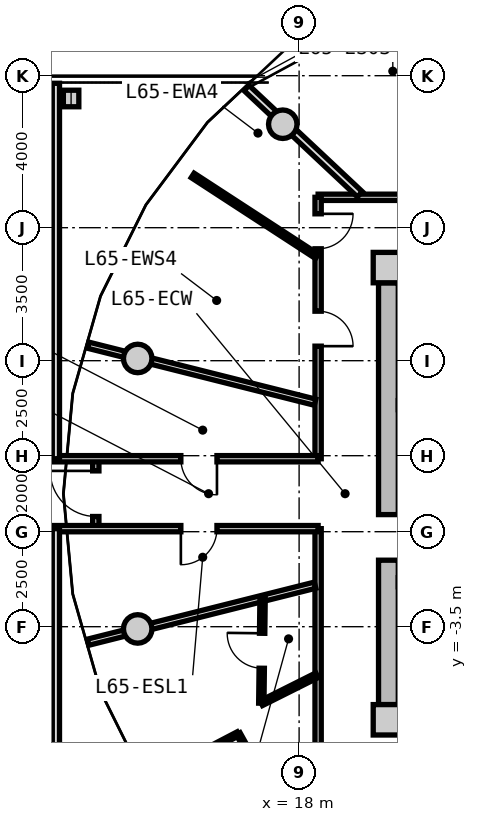
"""IFC4 building model, lengths in metres.
Left out: names, types, materials, properties, quantities, classifications, styles, units other than length and angle.
Written with IfcOpenShell. Run it as: python <this file> out.ifc"""

import sys

from ifc_helpers import new_model, si_unit, direction, frame, frame_2d, origin, origin_2d, place, context, subcontext, project, spatial, rectangle, circle, i_section, extrude, source, transform, mapped, element, fill, save


model = new_model("IFC4")
c1 = context("Model", 3, precision=1e-05, world=origin(), true_north=direction((0.0, 1.0)))
c2 = subcontext(c1, "Body", "Model", "MODEL_VIEW")
j1 = project(units=[si_unit("LENGTHUNIT", "METRE"), si_unit("PLANEANGLEUNIT", "RADIAN")], contexts=[c1])
p1 = place(None, origin())
s1 = spatial("IfcSite", under=j1, at=p1, CompositionType="ELEMENT")
p2 = place(p1, origin())
s2 = spatial("IfcBuilding", under=s1, at=p2, CompositionType="ELEMENT")
p3 = place(p2, frame((0.0, 0.0, 210.85)))
s3 = spatial("IfcBuildingStorey", under=s2, at=p3, CompositionType="ELEMENT", Elevation=210.85)
m1 = source(origin(), c2, "Body", "SweptSolid", [
    extrude(rectangle(XDim=0.8, YDim=0.8, at=origin_2d()), origin(), (0.0, 0.0, 1.0), 3.05),
])
for number, where, z_axis, x_axis in (
    (1, (20.35, -5.95, 0.0), (0.0, 0.0, 1.0), (1.0, 0.0, 0.0)),
    (2, (20.35, 5.95, 0.0), (0.0, 0.0, 1.0), (1.0, 0.0, 0.0)),
):
    element("IfcColumn", number, at=place(p3, frame(where, z_axis=z_axis, x_axis=x_axis)), inside=s3, PredefinedType="COLUMN", context=c2, shape_type="MappedRepresentation", body=[
        mapped(m1, transform((0.0, 0.0, 0.0), x_axis=(1.0, 0.0, 0.0), y_axis=(0.0, 1.0, 0.0), z_axis=(0.0, 0.0, 1.0), scale=1.0)),
    ])
m2 = source(origin(), c2, "Body", "SweptSolid", [
    extrude(rectangle(XDim=11.1, YDim=0.52, at=frame_2d((5.55, 0.0))), origin(), (0.0, 0.0, 1.0), 2.76),
])
p4 = place(p3, frame((20.35, -5.55, 0.0), z_axis=(0.0, 0.0, 1.0), x_axis=(0.0, 1.0, 0.0)))
e3 = element("IfcWall", 3, at=p4, inside=s3, PredefinedType="SHEAR", context=c2, shape_type="MappedRepresentation", body=[
    mapped(m2, transform((0.0, 0.0, 0.0), x_axis=(1.0, 0.0, 0.0), y_axis=(0.0, 1.0, 0.0), z_axis=(0.0, 0.0, 1.0), scale=1.0)),
])
p5 = place(p4, frame((3.8, 0.0, 0.0)))
e4 = element("IfcOpeningElement", 4, at=p5, cuts=e3, PredefinedType="OPENING", context=c2, shape_type="SweptSolid", body=[
    extrude(rectangle(XDim=1.2, YDim=2.15, at=frame_2d((0.6, 1.075))), frame((0.0, 0.27, 0.0), z_axis=(0.0, -1.0, 0.0), x_axis=(1.0, 0.0, 0.0)), (0.0, 0.0, 1.0), 0.54),
])
m3 = source(origin(), c2, "Body", "SweptSolid", [
    extrude(circle(Radius=0.375, at=origin_2d()), origin(), (0.0, 0.0, 1.0), 3.05),
])
for number, where, z_axis, x_axis in (
    (5, (17.57, 9.723, 0.0), (0.0, 0.0, 1.0), (1.0, 0.0, 0.0)),
    (6, (13.753, 3.559, 0.0), (0.0, 0.0, 1.0), (1.0, 0.0, 0.0)),
    (7, (13.753, -3.559, 0.0), (0.0, 0.0, 1.0), (1.0, 0.0, 0.0)),
):
    element("IfcColumn", number, at=place(p3, frame(where, z_axis=z_axis, x_axis=x_axis)), inside=s3, PredefinedType="COLUMN", context=c2, shape_type="MappedRepresentation", body=[
        mapped(m3, transform((0.0, 0.0, 0.0), x_axis=(1.0, 0.0, 0.0), y_axis=(0.0, 1.0, 0.0), z_axis=(0.0, 0.0, 1.0), scale=1.0)),
    ])
m4 = source(origin(), c2, "Body", "SweptSolid", [
    extrude(i_section(OverallWidth=0.407, OverallDepth=0.435, WebThickness=0.024, FlangeThickness=0.039, FilletRadius=0.015, at=origin_2d()), origin(), (0.0, 0.0, 1.0), 3.05),
])
p6 = place(p3, frame((12.0, 10.4, 0.0), z_axis=(0.0, 0.0, 1.0), x_axis=(1.0, 0.0, 0.0)))
e8 = element("IfcColumn", 8, at=p6, inside=s3, PredefinedType="COLUMN", context=c2, shape_type="MappedRepresentation", body=[
    mapped(m4, transform((0.0, 0.0, 0.0), x_axis=(1.0, 0.0, 0.0), y_axis=(0.0, 1.0, 0.0), z_axis=(0.0, 0.0, 1.0), scale=1.0)),
])
m5 = source(origin(), c2, "Body", "SweptSolid", [
    extrude(rectangle(XDim=8.58, YDim=0.165, at=frame_2d((4.29, 0.0))), origin(), (0.0, 0.0, 1.0), 2.745),
])
p7 = place(p3, frame((18.5, 7.8, 0.0), z_axis=(0.0, 0.0, 1.0), x_axis=(1.0, 0.0, 0.0)))
e9 = element("IfcWall", 9, at=p7, inside=s3, PredefinedType="PARTITIONING", context=c2, shape_type="MappedRepresentation", body=[
    mapped(m5, transform((0.0, 0.0, 0.0), x_axis=(1.0, 0.0, 0.0), y_axis=(0.0, 1.0, 0.0), z_axis=(0.0, 0.0, 1.0), scale=1.0)),
])
p8 = place(p7, frame((2.515, 0.0, 0.0)))
e10 = element("IfcOpeningElement", 10, at=p8, cuts=e9, PredefinedType="OPENING", context=c2, shape_type="SweptSolid", body=[
    extrude(rectangle(XDim=1.05, YDim=2.15, at=frame_2d((0.525, 1.075))), frame((0.0, 0.093, 0.0), z_axis=(0.0, -1.0, 0.0), x_axis=(1.0, 0.0, 0.0)), (0.0, 0.0, 1.0), 0.185),
])
m6 = source(origin(), c2, "Body", "SweptSolid", [
    extrude(rectangle(XDim=6.88, YDim=0.165, at=frame_2d((3.44, 0.0))), origin(), (0.0, 0.0, 1.0), 2.745),
])
p9 = place(p3, frame((18.5, -7.8, 0.0), z_axis=(0.0, 0.0, 1.0), x_axis=(0.0, 1.0, 0.0)))
e11 = element("IfcWall", 11, at=p9, inside=s3, PredefinedType="PARTITIONING", context=c2, shape_type="MappedRepresentation", body=[
    mapped(m6, transform((0.0, 0.0, 0.0), x_axis=(1.0, 0.0, 0.0), y_axis=(0.0, 1.0, 0.0), z_axis=(0.0, 0.0, 1.0), scale=1.0)),
])
p10 = place(p3, frame((18.5, 0.92, 0.0), z_axis=(0.0, 0.0, 1.0), x_axis=(0.0, 1.0, 0.0)))
e12 = element("IfcWall", 12, at=p10, inside=s3, PredefinedType="PARTITIONING", context=c2, shape_type="MappedRepresentation", body=[
    mapped(m6, transform((0.0, 0.0, 0.0), x_axis=(1.0, 0.0, 0.0), y_axis=(0.0, 1.0, 0.0), z_axis=(0.0, 0.0, 1.0), scale=1.0)),
])
p11 = place(p10, frame((5.525, 0.0, 0.0)))
e13 = element("IfcOpeningElement", 13, at=p11, cuts=e12, PredefinedType="OPENING", context=c2, shape_type="SweptSolid", body=[
    extrude(rectangle(XDim=0.92, YDim=2.1, at=frame_2d((0.46, 1.05))), frame((0.0, 0.093, 0.0), z_axis=(0.0, -1.0, 0.0), x_axis=(1.0, 0.0, 0.0)), (0.0, 0.0, 1.0), 0.185),
])
p12 = place(p10, frame((2.962, 0.0, 0.0)))
e14 = element("IfcOpeningElement", 14, at=p12, cuts=e12, PredefinedType="OPENING", context=c2, shape_type="SweptSolid", body=[
    extrude(rectangle(XDim=0.92, YDim=2.1, at=frame_2d((0.46, 1.05))), frame((0.0, 0.093, 0.0), z_axis=(0.0, -1.0, 0.0), x_axis=(1.0, 0.0, 0.0)), (0.0, 0.0, 1.0), 0.185),
])
m7 = source(origin(), c2, "Body", "SweptSolid", [
    extrude(rectangle(XDim=6.157, YDim=0.165, at=frame_2d((3.079, 0.0))), origin(), (0.0, 0.0, 1.0), 2.345),
])
for number, where, z_axis, x_axis in (
    (15, (18.42, 2.407, 0.0), (0.0, 0.0, 1.0), (-0.97, 0.244, 0.0)),
    (16, (18.42, -2.407, 0.0), (0.0, 0.0, 1.0), (-0.97, -0.244, 0.0)),
):
    element("IfcWall", number, at=place(p3, frame(where, z_axis=z_axis, x_axis=x_axis)), inside=s3, PredefinedType="PARTITIONING", context=c2, shape_type="MappedRepresentation", body=[
        mapped(m7, transform((0.0, 0.0, 0.0), x_axis=(1.0, 0.0, 0.0), y_axis=(0.0, 1.0, 0.0), z_axis=(0.0, 0.0, 1.0), scale=1.0)),
    ])
m8 = source(origin(), c2, "Body", "SweptSolid", [
    extrude(rectangle(XDim=4.089, YDim=0.19, at=frame_2d((2.044, 0.0))), origin(), (0.0, 0.0, 1.0), 2.345),
])
p13 = place(p3, frame((19.598, 7.88, 0.0), z_axis=(0.0, 0.0, 1.0), x_axis=(-0.729401273609, 0.684086092577, 0.0)))
e17 = element("IfcWall", 17, at=p13, inside=s3, PredefinedType="PARTITIONING", context=c2, shape_type="MappedRepresentation", body=[
    mapped(m8, transform((0.0, 0.0, 0.0), x_axis=(1.0, 0.0, 0.0), y_axis=(0.0, 1.0, 0.0), z_axis=(0.0, 0.0, 1.0), scale=1.0)),
])
m9 = source(origin(), c2, "Body", "SweptSolid", [
    extrude(rectangle(XDim=3.904, YDim=0.14, at=frame_2d((1.952, 0.0))), origin(), (0.0, 0.0, 1.0), 2.745),
])
p14 = place(p3, frame((18.47, 6.246, 0.0), z_axis=(0.0, 0.0, 1.0), x_axis=(-0.838024687996, 0.545632314209, 0.0)))
e18 = element("IfcWall", 18, at=p14, inside=s3, PredefinedType="PARTITIONING", context=c2, shape_type="MappedRepresentation", body=[
    mapped(m9, transform((0.0, 0.0, 0.0), x_axis=(1.0, 0.0, 0.0), y_axis=(0.0, 1.0, 0.0), z_axis=(0.0, 0.0, 1.0), scale=1.0)),
])
m10 = source(origin(), c2, "Body", "SweptSolid", [
    extrude(rectangle(XDim=1.638, YDim=0.14, at=frame_2d((0.819, 0.0))), origin(), (0.0, 0.0, 1.0), 2.745),
])
p15 = place(p3, frame((18.47, -4.778, 0.0), z_axis=(0.0, 0.0, 1.0), x_axis=(-0.893919977945, -0.448226586707, 0.0)))
e19 = element("IfcWall", 19, at=p15, inside=s3, PredefinedType="PARTITIONING", context=c2, shape_type="MappedRepresentation", body=[
    mapped(m10, transform((0.0, 0.0, 0.0), x_axis=(1.0, 0.0, 0.0), y_axis=(0.0, 1.0, 0.0), z_axis=(0.0, 0.0, 1.0), scale=1.0)),
])
m11 = source(origin(), c2, "Body", "SweptSolid", [
    extrude(rectangle(XDim=2.759, YDim=0.14, at=frame_2d((1.379, 0.0))), origin(), (0.0, 0.0, 1.0), 2.745),
])
p16 = place(p3, frame((17.005, -5.513, 0.0), z_axis=(0.0, 0.0, 1.0), x_axis=(0.01194710728, 0.999928630767, 0.0)))
e20 = element("IfcWall", 20, at=p16, inside=s3, PredefinedType="PARTITIONING", context=c2, shape_type="MappedRepresentation", body=[
    mapped(m11, transform((0.0, 0.0, 0.0), x_axis=(1.0, 0.0, 0.0), y_axis=(0.0, 1.0, 0.0), z_axis=(0.0, 0.0, 1.0), scale=1.0)),
])
p17 = place(p16, frame((0.919, 0.0, 0.0)))
e21 = element("IfcOpeningElement", 21, at=p17, cuts=e20, PredefinedType="OPENING", context=c2, shape_type="SweptSolid", body=[
    extrude(rectangle(XDim=0.92, YDim=2.1, at=frame_2d((0.46, 1.05))), frame((0.0, 0.08, 0.0), z_axis=(0.0, -1.0, 0.0), x_axis=(1.0, 0.0, 0.0)), (0.0, 0.0, 1.0), 0.16),
])
m12 = source(origin(), c2, "Body", "SweptSolid", [
    extrude(rectangle(XDim=2.104, YDim=0.115, at=frame_2d((1.052, 0.0))), origin(), (0.0, 0.0, 1.0), 2.745),
])
p18 = place(p3, frame((16.396, -6.317, 0.0), z_axis=(0.0, 0.0, 1.0), x_axis=(-0.886060817493, -0.463569010724, 0.0)))
e22 = element("IfcWall", 22, at=p18, inside=s3, PredefinedType="PARTITIONING", context=c2, shape_type="MappedRepresentation", body=[
    mapped(m12, transform((0.0, 0.0, 0.0), x_axis=(1.0, 0.0, 0.0), y_axis=(0.0, 1.0, 0.0), z_axis=(0.0, 0.0, 1.0), scale=1.0)),
])
m13 = source(origin(), c2, "Body", "SweptSolid", [
    extrude(rectangle(XDim=3.472, YDim=0.115, at=frame_2d((1.736, 0.0))), origin(), (0.0, 0.0, 1.0), 2.745),
])
p19 = place(p3, frame((16.396, -6.317, 0.0), z_axis=(0.0, 0.0, 1.0), x_axis=(0.485804139346, -0.874067696574, 0.0)))
e23 = element("IfcWall", 23, at=p19, inside=s3, PredefinedType="PARTITIONING", context=c2, shape_type="MappedRepresentation", body=[
    mapped(m13, transform((0.0, 0.0, 0.0), x_axis=(1.0, 0.0, 0.0), y_axis=(0.0, 1.0, 0.0), z_axis=(0.0, 0.0, 1.0), scale=1.0)),
])
p20 = place(p19, frame((1.261, 0.0, 0.0)))
e24 = element("IfcOpeningElement", 24, at=p20, cuts=e23, PredefinedType="OPENING", context=c2, shape_type="SweptSolid", body=[
    extrude(rectangle(XDim=0.95, YDim=2.1, at=frame_2d((0.475, 1.05))), frame((0.0, 0.067, 0.0), z_axis=(0.0, -1.0, 0.0), x_axis=(1.0, 0.0, 0.0)), (0.0, 0.0, 1.0), 0.135),
])
m14 = source(origin(), c2, "Body", "SweptSolid", [
    extrude(rectangle(XDim=1.84, YDim=0.165, at=frame_2d((0.92, 0.0))), origin(), (0.0, 0.0, 1.0), 2.745),
])
p21 = place(p3, frame((12.65, -0.92, 0.0), z_axis=(0.0, 0.0, 1.0), x_axis=(0.0, 1.0, 0.0)))
e25 = element("IfcWall", 25, at=p21, inside=s3, PredefinedType="PARTITIONING", context=c2, shape_type="MappedRepresentation", body=[
    mapped(m14, transform((0.0, 0.0, 0.0), x_axis=(1.0, 0.0, 0.0), y_axis=(0.0, 1.0, 0.0), z_axis=(0.0, 0.0, 1.0), scale=1.0)),
])
p22 = place(p21, frame((0.32, 0.0, 0.0)))
e26 = element("IfcOpeningElement", 26, at=p22, cuts=e25, PredefinedType="OPENING", context=c2, shape_type="SweptSolid", body=[
    extrude(rectangle(XDim=1.2, YDim=2.15, at=frame_2d((0.6, 1.075))), frame((0.0, 0.093, 0.0), z_axis=(0.0, -1.0, 0.0), x_axis=(1.0, 0.0, 0.0)), (0.0, 0.0, 1.0), 0.185),
])
m15 = source(origin(), c2, "Body", "SweptSolid", [
    extrude(rectangle(XDim=37.0, YDim=0.165, at=frame_2d((18.5, 0.0))), origin(), (0.0, 0.0, 1.0), 2.745),
])
p23 = place(p3, frame((-18.5, -0.92, 0.0), z_axis=(0.0, 0.0, 1.0), x_axis=(1.0, 0.0, 0.0)))
e27 = element("IfcWall", 27, at=p23, inside=s3, PredefinedType="PARTITIONING", context=c2, shape_type="MappedRepresentation", body=[
    mapped(m15, transform((0.0, 0.0, 0.0), x_axis=(1.0, 0.0, 0.0), y_axis=(0.0, 1.0, 0.0), z_axis=(0.0, 0.0, 1.0), scale=1.0)),
])
p24 = place(p23, frame((2.662, 0.0, 0.0)))
e28 = element("IfcOpeningElement", 28, at=p24, cuts=e27, PredefinedType="OPENING", context=c2, shape_type="SweptSolid", body=[
    extrude(rectangle(XDim=0.95, YDim=2.1, at=frame_2d((0.475, 1.05))), frame((0.0, 0.093, 0.0), z_axis=(0.0, -1.0, 0.0), x_axis=(1.0, 0.0, 0.0)), (0.0, 0.0, 1.0), 0.185),
])
p25 = place(p23, frame((33.388, 0.0, 0.0)))
e29 = element("IfcOpeningElement", 29, at=p25, cuts=e27, PredefinedType="OPENING", context=c2, shape_type="SweptSolid", body=[
    extrude(rectangle(XDim=0.95, YDim=2.1, at=frame_2d((0.475, 1.05))), frame((0.0, 0.093, 0.0), z_axis=(0.0, -1.0, 0.0), x_axis=(1.0, 0.0, 0.0)), (0.0, 0.0, 1.0), 0.185),
])
p26 = place(p23, frame((9.075, 0.0, 0.0)))
e30 = element("IfcOpeningElement", 30, at=p26, cuts=e27, PredefinedType="OPENING", context=c2, shape_type="SweptSolid", body=[
    extrude(rectangle(XDim=1.25, YDim=2.2, at=frame_2d((0.625, 1.1))), frame((0.0, 0.093, 0.0), z_axis=(0.0, -1.0, 0.0), x_axis=(1.0, 0.0, 0.0)), (0.0, 0.0, 1.0), 0.185),
])
p27 = place(p23, frame((14.875, 0.0, 0.0)))
e31 = element("IfcOpeningElement", 31, at=p27, cuts=e27, PredefinedType="OPENING", context=c2, shape_type="SweptSolid", body=[
    extrude(rectangle(XDim=1.25, YDim=2.2, at=frame_2d((0.625, 1.1))), frame((0.0, 0.093, 0.0), z_axis=(0.0, -1.0, 0.0), x_axis=(1.0, 0.0, 0.0)), (0.0, 0.0, 1.0), 0.185),
])
p28 = place(p23, frame((20.875, 0.0, 0.0)))
e32 = element("IfcOpeningElement", 32, at=p28, cuts=e27, PredefinedType="OPENING", context=c2, shape_type="SweptSolid", body=[
    extrude(rectangle(XDim=1.25, YDim=2.2, at=frame_2d((0.625, 1.1))), frame((0.0, 0.093, 0.0), z_axis=(0.0, -1.0, 0.0), x_axis=(1.0, 0.0, 0.0)), (0.0, 0.0, 1.0), 0.185),
])
p29 = place(p23, frame((26.675, 0.0, 0.0)))
e33 = element("IfcOpeningElement", 33, at=p29, cuts=e27, PredefinedType="OPENING", context=c2, shape_type="SweptSolid", body=[
    extrude(rectangle(XDim=1.25, YDim=2.2, at=frame_2d((0.625, 1.1))), frame((0.0, 0.093, 0.0), z_axis=(0.0, -1.0, 0.0), x_axis=(1.0, 0.0, 0.0)), (0.0, 0.0, 1.0), 0.185),
])
p30 = place(p3, frame((-18.5, 0.92, 0.0), z_axis=(0.0, 0.0, 1.0), x_axis=(1.0, 0.0, 0.0)))
e34 = element("IfcWall", 34, at=p30, inside=s3, PredefinedType="PARTITIONING", context=c2, shape_type="MappedRepresentation", body=[
    mapped(m15, transform((0.0, 0.0, 0.0), x_axis=(1.0, 0.0, 0.0), y_axis=(0.0, 1.0, 0.0), z_axis=(0.0, 0.0, 1.0), scale=1.0)),
])
p31 = place(p30, frame((2.662, 0.0, 0.0)))
e35 = element("IfcOpeningElement", 35, at=p31, cuts=e34, PredefinedType="OPENING", context=c2, shape_type="SweptSolid", body=[
    extrude(rectangle(XDim=0.95, YDim=2.1, at=frame_2d((0.475, 1.05))), frame((0.0, 0.093, 0.0), z_axis=(0.0, -1.0, 0.0), x_axis=(1.0, 0.0, 0.0)), (0.0, 0.0, 1.0), 0.185),
])
p32 = place(p30, frame((33.388, 0.0, 0.0)))
e36 = element("IfcOpeningElement", 36, at=p32, cuts=e34, PredefinedType="OPENING", context=c2, shape_type="SweptSolid", body=[
    extrude(rectangle(XDim=0.95, YDim=2.1, at=frame_2d((0.475, 1.05))), frame((0.0, 0.093, 0.0), z_axis=(0.0, -1.0, 0.0), x_axis=(1.0, 0.0, 0.0)), (0.0, 0.0, 1.0), 0.185),
])
p33 = place(p30, frame((7.64, 0.0, 0.0)))
e37 = element("IfcOpeningElement", 37, at=p33, cuts=e34, PredefinedType="OPENING", context=c2, shape_type="SweptSolid", body=[
    extrude(rectangle(XDim=0.92, YDim=2.1, at=frame_2d((0.46, 1.05))), frame((0.0, 0.093, 0.0), z_axis=(0.0, -1.0, 0.0), x_axis=(1.0, 0.0, 0.0)), (0.0, 0.0, 1.0), 0.185),
])
p34 = place(p30, frame((10.275, 0.0, 0.0)))
e38 = element("IfcOpeningElement", 38, at=p34, cuts=e34, PredefinedType="OPENING", context=c2, shape_type="SweptSolid", body=[
    extrude(rectangle(XDim=1.25, YDim=2.2, at=frame_2d((0.625, 1.1))), frame((0.0, 0.093, 0.0), z_axis=(0.0, -1.0, 0.0), x_axis=(1.0, 0.0, 0.0)), (0.0, 0.0, 1.0), 0.185),
])
p35 = place(p30, frame((14.875, 0.0, 0.0)))
e39 = element("IfcOpeningElement", 39, at=p35, cuts=e34, PredefinedType="OPENING", context=c2, shape_type="SweptSolid", body=[
    extrude(rectangle(XDim=1.25, YDim=2.2, at=frame_2d((0.625, 1.1))), frame((0.0, 0.093, 0.0), z_axis=(0.0, -1.0, 0.0), x_axis=(1.0, 0.0, 0.0)), (0.0, 0.0, 1.0), 0.185),
])
p36 = place(p30, frame((20.875, 0.0, 0.0)))
e40 = element("IfcOpeningElement", 40, at=p36, cuts=e34, PredefinedType="OPENING", context=c2, shape_type="SweptSolid", body=[
    extrude(rectangle(XDim=1.25, YDim=2.2, at=frame_2d((0.625, 1.1))), frame((0.0, 0.093, 0.0), z_axis=(0.0, -1.0, 0.0), x_axis=(1.0, 0.0, 0.0)), (0.0, 0.0, 1.0), 0.185),
])
p37 = place(p30, frame((26.675, 0.0, 0.0)))
e41 = element("IfcOpeningElement", 41, at=p37, cuts=e34, PredefinedType="OPENING", context=c2, shape_type="SweptSolid", body=[
    extrude(rectangle(XDim=1.25, YDim=2.2, at=frame_2d((0.625, 1.1))), frame((0.0, 0.093, 0.0), z_axis=(0.0, -1.0, 0.0), x_axis=(1.0, 0.0, 0.0)), (0.0, 0.0, 1.0), 0.185),
])
m16 = source(origin(), c2, "Body", "SweptSolid", [
    extrude(rectangle(XDim=9.88, YDim=0.19, at=frame_2d((4.94, 0.0))), origin(), (0.0, 0.0, 1.0), 2.745),
])
for number, where, z_axis, x_axis in (
    (42, (11.6, -10.8, 0.0), (0.0, 0.0, 1.0), (0.0, 1.0, 0.0)),
    (43, (11.6, 0.92, 0.0), (0.0, 0.0, 1.0), (0.0, 1.0, 0.0)),
):
    element("IfcWall", number, at=place(p3, frame(where, z_axis=z_axis, x_axis=x_axis)), inside=s3, PredefinedType="PARTITIONING", context=c2, shape_type="MappedRepresentation", body=[
        mapped(m16, transform((0.0, 0.0, 0.0), x_axis=(1.0, 0.0, 0.0), y_axis=(0.0, 1.0, 0.0), z_axis=(0.0, 0.0, 1.0), scale=1.0)),
    ])
m17 = source(origin(), c2, "Body", "SweptSolid", [
    extrude(rectangle(XDim=1.2, YDim=2.15, at=frame_2d((0.6, 1.075))), frame((0.0, 0.025, 0.0), z_axis=(0.0, -1.0, 0.0), x_axis=(1.0, 0.0, 0.0)), (0.0, 0.0, 1.0), 0.05),
])
p38 = place(p5, frame((1.2, 0.0, 0.0), z_axis=(0.0, 0.0, 1.0), x_axis=(-1.0, 0.0, 0.0)))
e44 = element("IfcDoor", 44, at=p38, inside=s3, OperationType="SINGLE_SWING_LEFT", PredefinedType="DOOR", context=c2, shape_type="MappedRepresentation", body=[
    mapped(m17, transform((0.0, 0.0, 0.0), x_axis=(1.0, 0.0, 0.0), y_axis=(0.0, 1.0, 0.0), z_axis=(0.0, 0.0, 1.0), scale=1.0)),
])
fill(e4, e44)
m18 = source(origin(), c2, "Body", "SweptSolid", [
    extrude(rectangle(XDim=0.95, YDim=2.1, at=frame_2d((0.475, 1.05))), frame((0.0, 0.025, 0.0), z_axis=(0.0, -1.0, 0.0), x_axis=(1.0, 0.0, 0.0)), (0.0, 0.0, 1.0), 0.05),
])
p39 = place(p25, frame((0.95, 0.0, 0.0), z_axis=(0.0, 0.0, 1.0), x_axis=(-1.0, 0.0, 0.0)))
e45 = element("IfcDoor", 45, at=p39, inside=s3, OperationType="SINGLE_SWING_RIGHT", PredefinedType="DOOR", context=c2, shape_type="MappedRepresentation", body=[
    mapped(m18, transform((0.0, 0.0, 0.0), x_axis=(1.0, 0.0, 0.0), y_axis=(0.0, 1.0, 0.0), z_axis=(0.0, 0.0, 1.0), scale=1.0)),
])
fill(e29, e45)
p40 = place(p32, frame((0.95, 0.0, 0.0), z_axis=(0.0, 0.0, 1.0), x_axis=(-1.0, 0.0, 0.0)))
e46 = element("IfcDoor", 46, at=p40, inside=s3, OperationType="SINGLE_SWING_LEFT", PredefinedType="DOOR", context=c2, shape_type="MappedRepresentation", body=[
    mapped(m18, transform((0.0, 0.0, 0.0), x_axis=(1.0, 0.0, 0.0), y_axis=(0.0, 1.0, 0.0), z_axis=(0.0, 0.0, 1.0), scale=1.0)),
])
fill(e36, e46)
m19 = source(origin(), c2, "Body", "SweptSolid", [
    extrude(rectangle(XDim=0.92, YDim=2.1, at=frame_2d((0.46, 1.05))), frame((0.0, 0.025, 0.0), z_axis=(0.0, -1.0, 0.0), x_axis=(1.0, 0.0, 0.0)), (0.0, 0.0, 1.0), 0.05),
])
p41 = place(p11, frame((0.92, 0.0, 0.0), z_axis=(0.0, 0.0, 1.0), x_axis=(-1.0, 0.0, 0.0)))
e47 = element("IfcDoor", 47, at=p41, inside=s3, OperationType="SINGLE_SWING_LEFT", PredefinedType="DOOR", context=c2, shape_type="MappedRepresentation", body=[
    mapped(m19, transform((0.0, 0.0, 0.0), x_axis=(1.0, 0.0, 0.0), y_axis=(0.0, 1.0, 0.0), z_axis=(0.0, 0.0, 1.0), scale=1.0)),
])
fill(e13, e47)
p42 = place(p12, frame((0.92, 0.0, 0.0), z_axis=(0.0, 0.0, 1.0), x_axis=(-1.0, 0.0, 0.0)))
e48 = element("IfcDoor", 48, at=p42, inside=s3, OperationType="SINGLE_SWING_RIGHT", PredefinedType="DOOR", context=c2, shape_type="MappedRepresentation", body=[
    mapped(m19, transform((0.0, 0.0, 0.0), x_axis=(1.0, 0.0, 0.0), y_axis=(0.0, 1.0, 0.0), z_axis=(0.0, 0.0, 1.0), scale=1.0)),
])
fill(e14, e48)
p43 = place(p17, origin())
e49 = element("IfcDoor", 49, at=p43, inside=s3, OperationType="SINGLE_SWING_RIGHT", PredefinedType="DOOR", context=c2, shape_type="MappedRepresentation", body=[
    mapped(m19, transform((0.0, 0.0, 0.0), x_axis=(1.0, 0.0, 0.0), y_axis=(0.0, 1.0, 0.0), z_axis=(0.0, 0.0, 1.0), scale=1.0)),
])
fill(e21, e49)
p44 = place(p22, origin())
e50 = element("IfcDoor", 50, at=p44, inside=s3, OperationType="SINGLE_SWING_RIGHT", PredefinedType="DOOR", context=c2, shape_type="MappedRepresentation", body=[
    mapped(m17, transform((0.0, 0.0, 0.0), x_axis=(1.0, 0.0, 0.0), y_axis=(0.0, 1.0, 0.0), z_axis=(0.0, 0.0, 1.0), scale=1.0)),
])
fill(e26, e50)
save(model, sys.argv[1])
